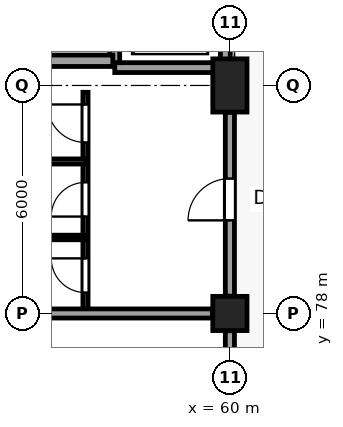
"""IFC4 building model, lengths in metres.
Left out: names, types, materials, properties, quantities, classifications, styles, units other than length and angle.
Written with IfcOpenShell. Run it as: python <this file> out.ifc"""

import sys

from ifc_helpers import new_model, si_unit, direction, frame, frame_2d, origin, origin_2d, place, context, subcontext, project, spatial, rectangle, extrude, element, fill, save


model = new_model("IFC4")
c1 = context("Model", 3, precision=1e-05, world=origin(), true_north=direction((0.0, 1.0)))
c2 = subcontext(c1, "Body", "Model", "MODEL_VIEW")
j1 = project(units=[si_unit("LENGTHUNIT", "METRE"), si_unit("PLANEANGLEUNIT", "RADIAN")], contexts=[c1])
p1 = place(None, origin())
s1 = spatial("IfcSite", under=j1, at=p1, CompositionType="ELEMENT")
p2 = place(p1, origin())
s2 = spatial("IfcBuilding", under=s1, at=p2, CompositionType="ELEMENT")
p3 = place(p2, frame((0.0, 0.0, -4.8)))
s3 = spatial("IfcBuildingStorey", under=s2, at=p3, CompositionType="ELEMENT", Elevation=-4.8)
p4 = place(p3, frame((60.0, 78.0, 0.0), z_axis=(0.0, 0.0, 1.0), x_axis=(1.0, 0.0, 0.0)))
e1 = element("IfcColumn", 1, at=p4, inside=s3, PredefinedType="COLUMN", context=c2, shape_type="SweptSolid", body=[
    extrude(rectangle(XDim=0.9, YDim=0.9, at=origin_2d()), origin(), (0.0, 0.0, 1.0), 4.8),
])
p5 = place(p3, frame((60.0, 84.0, 0.0), z_axis=(0.0, 0.0, 1.0), x_axis=(1.0, 0.0, 0.0)))
e2 = element("IfcColumn", 2, at=p5, inside=s3, PredefinedType="COLUMN", context=c2, shape_type="SweptSolid", body=[
    extrude(rectangle(XDim=0.9, YDim=1.4, at=origin_2d()), origin(), (0.0, 0.0, 1.0), 4.8),
])
p6 = place(p3, frame((56.97, 84.47, -0.5), z_axis=(0.0, 0.0, 1.0), x_axis=(1.0, 0.0, 0.0)))
e3 = element("IfcWall", 3, at=p6, inside=s3, PredefinedType="SHEAR", context=c2, shape_type="SweptSolid", body=[
    extrude(rectangle(XDim=2.91, YDim=0.26, at=frame_2d((1.455, 0.0))), origin(), (0.0, 0.0, 1.0), 5.3),
])
p7 = place(p3, frame((59.88, 84.6, -0.5), z_axis=(0.0, 0.0, 1.0), x_axis=(0.0, 1.0, 0.0)))
e4 = element("IfcWall", 4, at=p7, inside=s3, PredefinedType="SHEAR", context=c2, shape_type="SweptSolid", body=[
    extrude(rectangle(XDim=2.25, YDim=0.26, at=frame_2d((1.125, 0.0))), origin(), (0.0, 0.0, 1.0), 5.3),
])
p8 = place(p3, frame((56.97, 84.6, -0.5), z_axis=(0.0, 0.0, 1.0), x_axis=(0.0, 1.0, 0.0)))
e5 = element("IfcWall", 5, at=p8, inside=s3, PredefinedType="SHEAR", context=c2, shape_type="SweptSolid", body=[
    extrude(rectangle(XDim=2.25, YDim=0.26, at=frame_2d((1.125, 0.0))), origin(), (0.0, 0.0, 1.0), 5.3),
])
p9 = place(p8, frame((0.575, 0.0, 0.5)))
e6 = element("IfcOpeningElement", 6, at=p9, cuts=e5, PredefinedType="OPENING", context=c2, shape_type="SweptSolid", body=[
    extrude(rectangle(XDim=1.1, YDim=2.2, at=frame_2d((0.55, 1.1))), frame((0.0, 0.14, 0.0), z_axis=(0.0, -1.0, 0.0), x_axis=(1.0, 0.0, 0.0)), (0.0, 0.0, 1.0), 0.28),
])
p10 = place(p3, frame((52.68, 84.65, -0.5), z_axis=(0.0, 0.0, 1.0), x_axis=(1.0, 0.0, 0.0)))
e7 = element("IfcWall", 7, at=p10, inside=s3, PredefinedType="SHEAR", context=c2, shape_type="SweptSolid", body=[
    extrude(rectangle(XDim=4.24, YDim=0.3, at=frame_2d((2.12, 0.0))), origin(), (0.0, 0.0, 1.0), 5.3),
])
p11 = place(p3, frame((56.2, 78.0, 0.0), z_axis=(0.0, 0.0, 1.0), x_axis=(0.0, 1.0, 0.0)))
e8 = element("IfcWall", 8, at=p11, inside=s3, PredefinedType="PARTITIONING", context=c2, shape_type="SweptSolid", body=[
    extrude(rectangle(XDim=5.82, YDim=0.135, at=frame_2d((2.91, 0.0))), origin(), (0.0, 0.0, 1.0), 4.5),
])
p12 = place(p11, frame((0.55, 0.0, 0.0)))
e9 = element("IfcOpeningElement", 9, at=p12, cuts=e8, PredefinedType="OPENING", context=c2, shape_type="SweptSolid", body=[
    extrude(rectangle(XDim=0.9, YDim=2.1, at=frame_2d((0.45, 1.05))), frame((0.0, 0.078, 0.0), z_axis=(0.0, -1.0, 0.0), x_axis=(1.0, 0.0, 0.0)), (0.0, 0.0, 1.0), 0.155),
])
p13 = place(p11, frame((2.55, 0.0, 0.0)))
e10 = element("IfcOpeningElement", 10, at=p13, cuts=e8, PredefinedType="OPENING", context=c2, shape_type="SweptSolid", body=[
    extrude(rectangle(XDim=0.9, YDim=2.1, at=frame_2d((0.45, 1.05))), frame((0.0, 0.078, 0.0), z_axis=(0.0, -1.0, 0.0), x_axis=(1.0, 0.0, 0.0)), (0.0, 0.0, 1.0), 0.155),
])
p14 = place(p11, frame((4.5, 0.0, 0.0)))
e11 = element("IfcOpeningElement", 11, at=p14, cuts=e8, PredefinedType="OPENING", context=c2, shape_type="SweptSolid", body=[
    extrude(rectangle(XDim=1.0, YDim=2.15, at=frame_2d((0.5, 1.075))), frame((0.0, 0.078, 0.0), z_axis=(0.0, -1.0, 0.0), x_axis=(1.0, 0.0, 0.0)), (0.0, 0.0, 1.0), 0.155),
])
p15 = place(p3, frame((60.0, 72.455, 0.0), z_axis=(0.0, 0.0, 1.0), x_axis=(0.0, 1.0, 0.0)))
e12 = element("IfcWall", 12, at=p15, inside=s3, PredefinedType="PARTITIONING", context=c2, shape_type="SweptSolid", body=[
    extrude(rectangle(XDim=5.09, YDim=0.24, at=frame_2d((2.545, 0.0))), origin(), (0.0, 0.0, 1.0), 3.7),
])
p16 = place(p15, frame((1.945, 0.0, 0.0)))
e13 = element("IfcOpeningElement", 13, at=p16, cuts=e12, PredefinedType="OPENING", context=c2, shape_type="SweptSolid", body=[
    extrude(rectangle(XDim=1.2, YDim=2.2, at=frame_2d((0.6, 1.1))), frame((0.0, 0.13, 0.0), z_axis=(0.0, -1.0, 0.0), x_axis=(1.0, 0.0, 0.0)), (0.0, 0.0, 1.0), 0.26),
])
p17 = place(p3, frame((60.0, 78.455, 0.0), z_axis=(0.0, 0.0, 1.0), x_axis=(0.0, 1.0, 0.0)))
e14 = element("IfcWall", 14, at=p17, inside=s3, PredefinedType="PARTITIONING", context=c2, shape_type="SweptSolid", body=[
    extrude(rectangle(XDim=4.84, YDim=0.24, at=frame_2d((2.42, 0.0))), origin(), (0.0, 0.0, 1.0), 3.7),
])
p18 = place(p17, frame((1.995, 0.0, 0.0)))
e15 = element("IfcOpeningElement", 15, at=p18, cuts=e14, PredefinedType="OPENING", context=c2, shape_type="SweptSolid", body=[
    extrude(rectangle(XDim=1.1, YDim=2.15, at=frame_2d((0.55, 1.075))), frame((0.0, 0.13, 0.0), z_axis=(0.0, -1.0, 0.0), x_axis=(1.0, 0.0, 0.0)), (0.0, 0.0, 1.0), 0.26),
])
p19 = place(p3, frame((54.455, 78.0, 0.0), z_axis=(0.0, 0.0, 1.0), x_axis=(1.0, 0.0, 0.0)))
e16 = element("IfcWall", 16, at=p19, inside=s3, PredefinedType="PARTITIONING", context=c2, shape_type="SweptSolid", body=[
    extrude(rectangle(XDim=5.09, YDim=0.24, at=frame_2d((2.545, 0.0))), origin(), (0.0, 0.0, 1.0), 4.21),
])
p20 = place(p3, frame((42.0, 80.0, 0.0), z_axis=(0.0, 0.0, 1.0), x_axis=(1.0, 0.0, 0.0)))
e17 = element("IfcWall", 17, at=p20, inside=s3, PredefinedType="PARTITIONING", context=c2, shape_type="SweptSolid", body=[
    extrude(rectangle(XDim=14.2, YDim=0.12, at=frame_2d((7.1, 0.0))), origin(), (0.0, 0.0, 1.0), 4.5),
])
p21 = place(p3, frame((42.0, 82.0, 0.0), z_axis=(0.0, 0.0, 1.0), x_axis=(1.0, 0.0, 0.0)))
e18 = element("IfcWall", 18, at=p21, inside=s3, PredefinedType="PARTITIONING", context=c2, shape_type="SweptSolid", body=[
    extrude(rectangle(XDim=14.2, YDim=0.135, at=frame_2d((7.1, 0.0))), origin(), (0.0, 0.0, 1.0), 4.5),
])
p22 = place(p18, origin())
e19 = element("IfcDoor", 19, at=p22, inside=s3, OperationType="SINGLE_SWING_LEFT", PredefinedType="DOOR", context=c2, shape_type="SweptSolid", body=[
    extrude(rectangle(XDim=1.1, YDim=2.15, at=frame_2d((0.55, 1.075))), frame((0.0, 0.025, 0.0), z_axis=(0.0, -1.0, 0.0), x_axis=(1.0, 0.0, 0.0)), (0.0, 0.0, 1.0), 0.05),
])
fill(e15, e19)
p23 = place(p12, origin())
e20 = element("IfcDoor", 20, at=p23, inside=s3, OperationType="SINGLE_SWING_RIGHT", PredefinedType="DOOR", context=c2, shape_type="SweptSolid", body=[
    extrude(rectangle(XDim=0.9, YDim=2.1, at=frame_2d((0.45, 1.05))), frame((0.0, 0.025, 0.0), z_axis=(0.0, -1.0, 0.0), x_axis=(1.0, 0.0, 0.0)), (0.0, 0.0, 1.0), 0.05),
])
fill(e9, e20)
p24 = place(p13, origin())
e21 = element("IfcDoor", 21, at=p24, inside=s3, OperationType="SINGLE_SWING_LEFT", PredefinedType="DOOR", context=c2, shape_type="SweptSolid", body=[
    extrude(rectangle(XDim=0.9, YDim=2.1, at=frame_2d((0.45, 1.05))), frame((0.0, 0.025, 0.0), z_axis=(0.0, -1.0, 0.0), x_axis=(1.0, 0.0, 0.0)), (0.0, 0.0, 1.0), 0.05),
])
fill(e10, e21)
p25 = place(p14, origin())
e22 = element("IfcDoor", 22, at=p25, inside=s3, OperationType="SINGLE_SWING_RIGHT", PredefinedType="DOOR", context=c2, shape_type="SweptSolid", body=[
    extrude(rectangle(XDim=1.0, YDim=2.15, at=frame_2d((0.5, 1.075))), frame((0.0, 0.025, 0.0), z_axis=(0.0, -1.0, 0.0), x_axis=(1.0, 0.0, 0.0)), (0.0, 0.0, 1.0), 0.05),
])
fill(e11, e22)
save(model, sys.argv[1])
